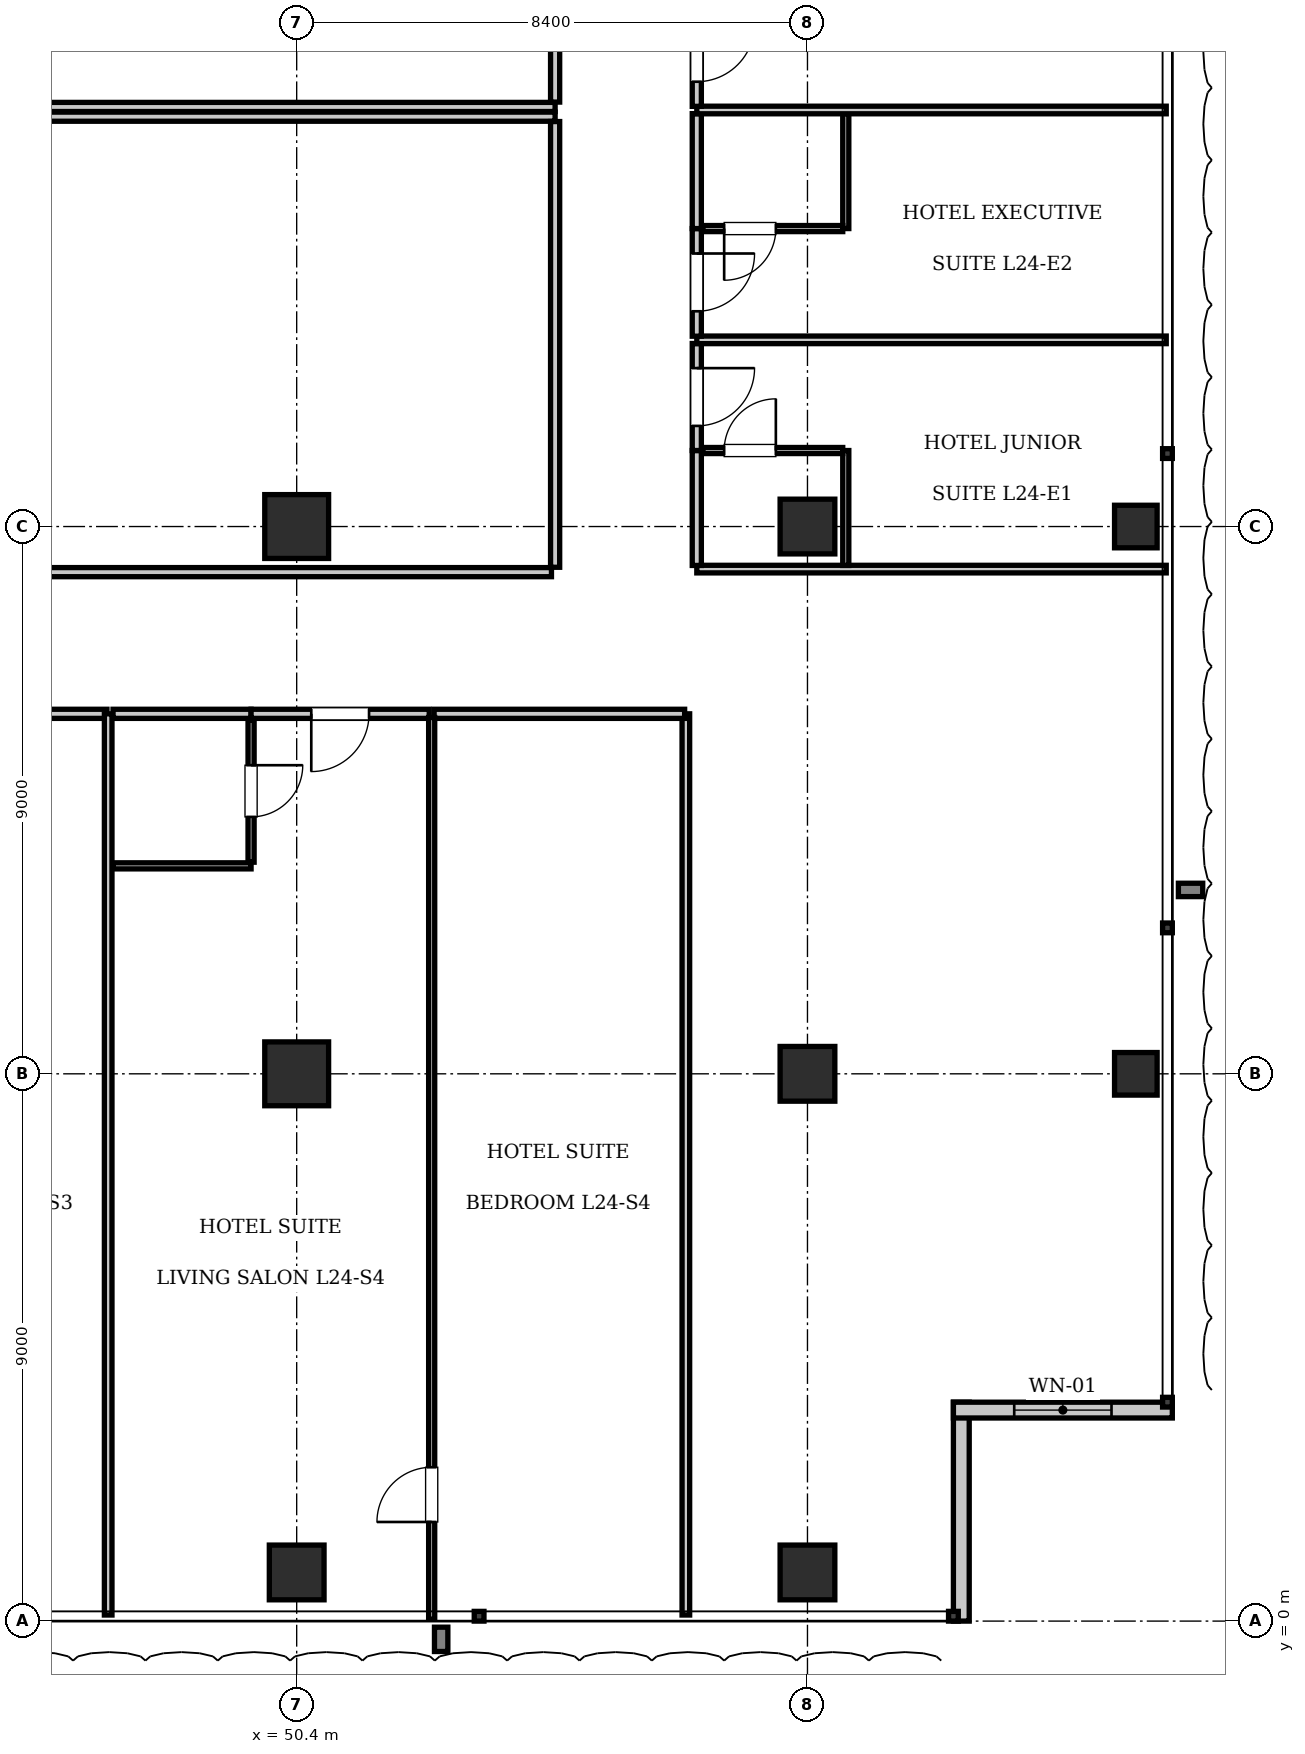
"""IFC4 building model, lengths in metres.
Left out: names, types, materials, properties, quantities, classifications, styles, units other than length and angle.
Written with IfcOpenShell. Run it as: python <this file> out.ifc"""

import sys

from ifc_helpers import new_model, si_unit, direction, frame, frame_2d, origin, origin_2d, place, context, subcontext, project, spatial, rectangle, i_section, extrude, element, fill, save


model = new_model("IFC4")
c1 = context("Model", 3, precision=1e-05, world=origin(), true_north=direction((0.0, 1.0)))
c2 = subcontext(c1, "Body", "Model", "MODEL_VIEW")
j1 = project(units=[si_unit("LENGTHUNIT", "METRE"), si_unit("PLANEANGLEUNIT", "RADIAN")], contexts=[c1])
p1 = place(None, origin())
s1 = spatial("IfcSite", under=j1, at=p1, CompositionType="ELEMENT")
p2 = place(p1, origin())
s2 = spatial("IfcBuilding", under=s1, at=p2, CompositionType="ELEMENT")
p3 = place(p2, frame((0.0, 0.0, 100.1)))
s3 = spatial("IfcBuildingStorey", under=s2, at=p3, CompositionType="ELEMENT", Elevation=100.1)
for number, where, z_axis, x_axis in (
    (1, (50.4, 18.0, 0.0), (0.0, 0.0, 1.0), (1.0, 0.0, 0.0)),
    (2, (50.4, 9.0, 0.0), (0.0, 0.0, 1.0), (1.0, 0.0, 0.0)),
):
    element("IfcColumn", number, at=place(p3, frame(where, z_axis=z_axis, x_axis=x_axis)), inside=s3, PredefinedType="COLUMN", context=c2, shape_type="SweptSolid", body=[
        extrude(rectangle(XDim=1.05, YDim=1.05, at=origin_2d()), origin(), (0.0, 0.0, 1.0), 3.85),
    ])
for number, where, z_axis, x_axis in (
    (3, (58.8, 9.0, 0.0), (0.0, 0.0, 1.0), (1.0, 0.0, 0.0)),
    (4, (58.8, 18.0, 0.0), (0.0, 0.0, 1.0), (1.0, 0.0, 0.0)),
    (5, (50.4, 0.8, 0.0), (0.0, 0.0, 1.0), (1.0, 0.0, 0.0)),
    (6, (58.8, 0.8, 0.0), (0.0, 0.0, 1.0), (1.0, 0.0, 0.0)),
):
    element("IfcColumn", number, at=place(p3, frame(where, z_axis=z_axis, x_axis=x_axis)), inside=s3, PredefinedType="COLUMN", context=c2, shape_type="SweptSolid", body=[
        extrude(rectangle(XDim=0.9, YDim=0.9, at=origin_2d()), origin(), (0.0, 0.0, 1.0), 3.85),
    ])
for number, where, z_axis, x_axis in (
    (7, (64.2, 9.0, 0.0), (0.0, 0.0, 1.0), (1.0, 0.0, 0.0)),
    (8, (64.2, 18.0, 0.0), (0.0, 0.0, 1.0), (1.0, 0.0, 0.0)),
):
    element("IfcColumn", number, at=place(p3, frame(where, z_axis=z_axis, x_axis=x_axis)), inside=s3, PredefinedType="COLUMN", context=c2, shape_type="SweptSolid", body=[
        extrude(i_section(OverallWidth=0.7, OverallDepth=0.7, WebThickness=0.028, FlangeThickness=0.044, at=origin_2d()), origin(), (0.0, 0.0, 1.0), 3.85),
    ])
p4 = place(p3, frame((61.33, 3.6, 0.0), z_axis=(0.0, 0.0, 1.0), x_axis=(0.0, -1.0, 0.0)))
e9 = element("IfcWall", 9, at=p4, inside=s3, PredefinedType="SOLIDWALL", context=c2, shape_type="SweptSolid", body=[
    extrude(rectangle(XDim=3.6, YDim=0.26, at=frame_2d((1.8, 0.0))), origin(), (0.0, 0.0, 1.0), 3.61),
])
p5 = place(p3, frame((64.8, 3.47, 0.0), z_axis=(0.0, 0.0, 1.0), x_axis=(-1.0, 0.0, 0.0)))
e10 = element("IfcWall", 10, at=p5, inside=s3, PredefinedType="SOLIDWALL", context=c2, shape_type="SweptSolid", body=[
    extrude(rectangle(XDim=3.6, YDim=0.26, at=frame_2d((1.8, 0.0))), origin(), (0.0, 0.0, 1.0), 3.61),
])
p6 = place(p5, frame((1.0, 0.0, 0.9)))
e11 = element("IfcOpeningElement", 11, at=p6, cuts=e10, PredefinedType="OPENING", context=c2, shape_type="SweptSolid", body=[
    extrude(rectangle(XDim=1.6, YDim=2.1, at=frame_2d((0.8, 1.05))), frame((0.0, 0.14, 0.0), z_axis=(0.0, -1.0, 0.0), x_axis=(1.0, 0.0, 0.0)), (0.0, 0.0, 1.0), 0.28),
])
p7 = place(p3, frame((20.95, 24.9, 0.0), z_axis=(0.0, 0.0, 1.0), x_axis=(1.0, 0.0, 0.0)))
e12 = element("IfcWall", 12, at=p7, inside=s3, PredefinedType="PARTITIONING", context=c2, shape_type="SweptSolid", body=[
    extrude(rectangle(XDim=33.7, YDim=0.15, at=frame_2d((16.85, 0.0))), origin(), (0.0, 0.0, 1.0), 3.61),
])
p8 = place(p3, frame((54.65, 24.98, 0.0), z_axis=(0.0, 0.0, 1.0), x_axis=(0.0, 1.0, 0.0)))
e13 = element("IfcWall", 13, at=p8, inside=s3, PredefinedType="PARTITIONING", context=c2, shape_type="SweptSolid", body=[
    extrude(rectangle(XDim=7.34, YDim=0.15, at=frame_2d((3.67, 0.0))), origin(), (0.0, 0.0, 1.0), 3.293),
])
p9 = place(p3, frame((20.95, 24.74, 0.0), z_axis=(0.0, 0.0, 1.0), x_axis=(1.0, 0.0, 0.0)))
e14 = element("IfcWall", 14, at=p9, inside=s3, PredefinedType="PARTITIONING", context=c2, shape_type="SweptSolid", body=[
    extrude(rectangle(XDim=33.7, YDim=0.15, at=frame_2d((16.85, 0.0))), origin(), (0.0, 0.0, 1.0), 3.61),
])
p10 = place(p3, frame((54.65, 17.33, 0.0), z_axis=(0.0, 0.0, 1.0), x_axis=(0.0, 1.0, 0.0)))
e15 = element("IfcWall", 15, at=p10, inside=s3, PredefinedType="PARTITIONING", context=c2, shape_type="SweptSolid", body=[
    extrude(rectangle(XDim=7.33, YDim=0.15, at=frame_2d((3.665, 0.0))), origin(), (0.0, 0.0, 1.0), 3.255),
])
p11 = place(p3, frame((33.449, 17.25, 0.0), z_axis=(0.0, 0.0, 1.0), x_axis=(1.0, 0.0, 0.0)))
e16 = element("IfcWall", 16, at=p11, inside=s3, PredefinedType="PARTITIONING", context=c2, shape_type="SweptSolid", body=[
    extrude(rectangle(XDim=21.141, YDim=0.15, at=frame_2d((10.571, 0.0))), origin(), (0.0, 0.0, 1.0), 3.61),
])
p12 = place(p11, frame((10.121, 0.0, 0.0)))
e17 = element("IfcOpeningElement", 17, at=p12, cuts=e16, PredefinedType="OPENING", context=c2, shape_type="SweptSolid", body=[
    extrude(rectangle(XDim=0.9, YDim=2.1, at=frame_2d((0.45, 1.05))), frame((0.0, 0.085, 0.0), z_axis=(0.0, -1.0, 0.0), x_axis=(1.0, 0.0, 0.0)), (0.0, 0.0, 1.0), 0.17),
])
p13 = place(p3, frame((56.8, 0.1, 0.0), z_axis=(0.0, 0.0, 1.0), x_axis=(0.0, 1.0, 0.0)))
e18 = element("IfcWall", 18, at=p13, inside=s3, PredefinedType="PARTITIONING", context=c2, shape_type="SweptSolid", body=[
    extrude(rectangle(XDim=14.82, YDim=0.125, at=frame_2d((7.41, 0.0))), origin(), (0.0, 0.0, 1.0), 3.61),
])
p14 = place(p3, frame((43.16, 14.92, 0.0), z_axis=(0.0, 0.0, 1.0), x_axis=(1.0, 0.0, 0.0)))
e19 = element("IfcWall", 19, at=p14, inside=s3, PredefinedType="PARTITIONING", context=c2, shape_type="SweptSolid", body=[
    extrude(rectangle(XDim=4.12, YDim=0.15, at=frame_2d((2.06, 0.0))), origin(), (0.0, 0.0, 1.0), 3.61),
])
p15 = place(p3, frame((47.3, 0.1, 0.0), z_axis=(0.0, 0.0, 1.0), x_axis=(0.0, 1.0, 0.0)))
e20 = element("IfcWall", 20, at=p15, inside=s3, PredefinedType="PARTITIONING", context=c2, shape_type="SweptSolid", body=[
    extrude(rectangle(XDim=14.82, YDim=0.125, at=frame_2d((7.41, 0.0))), origin(), (0.0, 0.0, 1.0), 3.61),
])
p16 = place(p3, frame((47.38, 14.92, 0.0), z_axis=(0.0, 0.0, 1.0), x_axis=(1.0, 0.0, 0.0)))
e21 = element("IfcWall", 21, at=p16, inside=s3, PredefinedType="PARTITIONING", context=c2, shape_type="SweptSolid", body=[
    extrude(rectangle(XDim=2.27, YDim=0.15, at=frame_2d((1.135, 0.0))), origin(), (0.0, 0.0, 1.0), 3.61),
])
p17 = place(p3, frame((47.38, 12.42, 0.0), z_axis=(0.0, 0.0, 1.0), x_axis=(1.0, 0.0, 0.0)))
e22 = element("IfcWall", 22, at=p17, inside=s3, PredefinedType="PARTITIONING", context=c2, shape_type="SweptSolid", body=[
    extrude(rectangle(XDim=2.27, YDim=0.1, at=frame_2d((1.135, 0.0))), origin(), (0.0, 0.0, 1.0), 3.61),
])
p18 = place(p3, frame((49.65, 12.48, 0.0), z_axis=(0.0, 0.0, 1.0), x_axis=(0.0, 1.0, 0.0)))
e23 = element("IfcWall", 23, at=p18, inside=s3, PredefinedType="PARTITIONING", context=c2, shape_type="SweptSolid", body=[
    extrude(rectangle(XDim=2.34, YDim=0.1, at=frame_2d((1.17, 0.0))), origin(), (0.0, 0.0, 1.0), 3.61),
])
p19 = place(p18, frame((0.745, 0.0, 0.0)))
e24 = element("IfcOpeningElement", 24, at=p19, cuts=e23, PredefinedType="OPENING", context=c2, shape_type="SweptSolid", body=[
    extrude(rectangle(XDim=0.85, YDim=2.1, at=frame_2d((0.425, 1.05))), frame((0.0, 0.06, 0.0), z_axis=(0.0, -1.0, 0.0), x_axis=(1.0, 0.0, 0.0)), (0.0, 0.0, 1.0), 0.12),
])
p20 = place(p3, frame((49.65, 14.92, 0.0), z_axis=(0.0, 0.0, 1.0), x_axis=(1.0, 0.0, 0.0)))
e25 = element("IfcWall", 25, at=p20, inside=s3, PredefinedType="PARTITIONING", context=c2, shape_type="SweptSolid", body=[
    extrude(rectangle(XDim=2.93, YDim=0.15, at=frame_2d((1.465, 0.0))), origin(), (0.0, 0.0, 1.0), 3.61),
])
p21 = place(p20, frame((0.99, 0.0, 0.0)))
e26 = element("IfcOpeningElement", 26, at=p21, cuts=e25, PredefinedType="OPENING", context=c2, shape_type="SweptSolid", body=[
    extrude(rectangle(XDim=0.95, YDim=2.15, at=frame_2d((0.475, 1.075))), frame((0.0, 0.085, 0.0), z_axis=(0.0, -1.0, 0.0), x_axis=(1.0, 0.0, 0.0)), (0.0, 0.0, 1.0), 0.17),
])
p22 = place(p3, frame((52.66, 14.92, 0.0), z_axis=(0.0, 0.0, 1.0), x_axis=(1.0, 0.0, 0.0)))
e27 = element("IfcWall", 27, at=p22, inside=s3, PredefinedType="PARTITIONING", context=c2, shape_type="SweptSolid", body=[
    extrude(rectangle(XDim=4.12, YDim=0.15, at=frame_2d((2.06, 0.0))), origin(), (0.0, 0.0, 1.0), 3.61),
])
p23 = place(p3, frame((52.62, 0.03, 0.0), z_axis=(0.0, 0.0, 1.0), x_axis=(0.0, 1.0, 0.0)))
e28 = element("IfcWall", 28, at=p23, inside=s3, PredefinedType="PARTITIONING", context=c2, shape_type="SweptSolid", body=[
    extrude(rectangle(XDim=14.83, YDim=0.1, at=frame_2d((7.415, 0.0))), origin(), (0.0, 0.0, 1.0), 3.61),
])
p24 = place(p23, frame((1.6, 0.0, 0.0)))
e29 = element("IfcOpeningElement", 29, at=p24, cuts=e28, PredefinedType="OPENING", context=c2, shape_type="SweptSolid", body=[
    extrude(rectangle(XDim=0.9, YDim=2.1, at=frame_2d((0.45, 1.05))), frame((0.0, 0.06, 0.0), z_axis=(0.0, -1.0, 0.0), x_axis=(1.0, 0.0, 0.0)), (0.0, 0.0, 1.0), 0.12),
])
p25 = place(p3, frame((56.98, 17.3, 0.0), z_axis=(0.0, 0.0, 1.0), x_axis=(1.0, 0.0, 0.0)))
e30 = element("IfcWall", 30, at=p25, inside=s3, PredefinedType="PARTITIONING", context=c2, shape_type="SweptSolid", body=[
    extrude(rectangle(XDim=7.72, YDim=0.125, at=frame_2d((3.86, 0.0))), origin(), (0.0, 0.0, 1.0), 3.61),
])
p26 = place(p3, frame((56.98, 17.36, 0.0), z_axis=(0.0, 0.0, 1.0), x_axis=(0.0, 1.0, 0.0)))
e31 = element("IfcWall", 31, at=p26, inside=s3, PredefinedType="PARTITIONING", context=c2, shape_type="SweptSolid", body=[
    extrude(rectangle(XDim=1.89, YDim=0.15, at=frame_2d((0.945, 0.0))), origin(), (0.0, 0.0, 1.0), 3.61),
])
p27 = place(p3, frame((56.98, 19.25, 0.0), z_axis=(0.0, 0.0, 1.0), x_axis=(0.0, 1.0, 0.0)))
e32 = element("IfcWall", 32, at=p27, inside=s3, PredefinedType="PARTITIONING", context=c2, shape_type="SweptSolid", body=[
    extrude(rectangle(XDim=1.76, YDim=0.15, at=frame_2d((0.88, 0.0))), origin(), (0.0, 0.0, 1.0), 3.61),
])
p28 = place(p27, frame((0.405, 0.0, 0.0)))
e33 = element("IfcOpeningElement", 33, at=p28, cuts=e32, PredefinedType="OPENING", context=c2, shape_type="SweptSolid", body=[
    extrude(rectangle(XDim=0.95, YDim=2.15, at=frame_2d((0.475, 1.075))), frame((0.0, 0.085, 0.0), z_axis=(0.0, -1.0, 0.0), x_axis=(1.0, 0.0, 0.0)), (0.0, 0.0, 1.0), 0.17),
])
p29 = place(p3, frame((59.43, 17.36, 0.0), z_axis=(0.0, 0.0, 1.0), x_axis=(0.0, 1.0, 0.0)))
e34 = element("IfcWall", 34, at=p29, inside=s3, PredefinedType="PARTITIONING", context=c2, shape_type="SweptSolid", body=[
    extrude(rectangle(XDim=1.89, YDim=0.1, at=frame_2d((0.945, 0.0))), origin(), (0.0, 0.0, 1.0), 3.61),
])
p30 = place(p3, frame((57.08, 19.25, 0.0), z_axis=(0.0, 0.0, 1.0), x_axis=(1.0, 0.0, 0.0)))
e35 = element("IfcWall", 35, at=p30, inside=s3, PredefinedType="PARTITIONING", context=c2, shape_type="SweptSolid", body=[
    extrude(rectangle(XDim=2.3, YDim=0.1, at=frame_2d((1.15, 0.0))), origin(), (0.0, 0.0, 1.0), 3.61),
])
p31 = place(p30, frame((0.35, 0.0, 0.0)))
e36 = element("IfcOpeningElement", 36, at=p31, cuts=e35, PredefinedType="OPENING", context=c2, shape_type="SweptSolid", body=[
    extrude(rectangle(XDim=0.85, YDim=2.1, at=frame_2d((0.425, 1.05))), frame((0.0, 0.06, 0.0), z_axis=(0.0, -1.0, 0.0), x_axis=(1.0, 0.0, 0.0)), (0.0, 0.0, 1.0), 0.12),
])
p32 = place(p3, frame((56.98, 21.07, 0.0), z_axis=(0.0, 0.0, 1.0), x_axis=(1.0, 0.0, 0.0)))
e37 = element("IfcWall", 37, at=p32, inside=s3, PredefinedType="PARTITIONING", context=c2, shape_type="SweptSolid", body=[
    extrude(rectangle(XDim=7.72, YDim=0.125, at=frame_2d((3.86, 0.0))), origin(), (0.0, 0.0, 1.0), 3.61),
])
p33 = place(p3, frame((56.98, 21.13, 0.0), z_axis=(0.0, 0.0, 1.0), x_axis=(0.0, 1.0, 0.0)))
e38 = element("IfcWall", 38, at=p33, inside=s3, PredefinedType="PARTITIONING", context=c2, shape_type="SweptSolid", body=[
    extrude(rectangle(XDim=1.77, YDim=0.15, at=frame_2d((0.885, 0.0))), origin(), (0.0, 0.0, 1.0), 3.61),
])
p34 = place(p33, frame((0.41, 0.0, 0.0)))
e39 = element("IfcOpeningElement", 39, at=p34, cuts=e38, PredefinedType="OPENING", context=c2, shape_type="SweptSolid", body=[
    extrude(rectangle(XDim=0.95, YDim=2.15, at=frame_2d((0.475, 1.075))), frame((0.0, 0.085, 0.0), z_axis=(0.0, -1.0, 0.0), x_axis=(1.0, 0.0, 0.0)), (0.0, 0.0, 1.0), 0.17),
])
p35 = place(p3, frame((56.98, 22.9, 0.0), z_axis=(0.0, 0.0, 1.0), x_axis=(0.0, 1.0, 0.0)))
e40 = element("IfcWall", 40, at=p35, inside=s3, PredefinedType="PARTITIONING", context=c2, shape_type="SweptSolid", body=[
    extrude(rectangle(XDim=1.89, YDim=0.15, at=frame_2d((0.945, 0.0))), origin(), (0.0, 0.0, 1.0), 3.61),
])
p36 = place(p3, frame((59.43, 22.9, 0.0), z_axis=(0.0, 0.0, 1.0), x_axis=(0.0, 1.0, 0.0)))
e41 = element("IfcWall", 41, at=p36, inside=s3, PredefinedType="PARTITIONING", context=c2, shape_type="SweptSolid", body=[
    extrude(rectangle(XDim=1.89, YDim=0.1, at=frame_2d((0.945, 0.0))), origin(), (0.0, 0.0, 1.0), 3.61),
])
p37 = place(p3, frame((57.08, 22.9, 0.0), z_axis=(0.0, 0.0, 1.0), x_axis=(1.0, 0.0, 0.0)))
e42 = element("IfcWall", 42, at=p37, inside=s3, PredefinedType="PARTITIONING", context=c2, shape_type="SweptSolid", body=[
    extrude(rectangle(XDim=2.3, YDim=0.1, at=frame_2d((1.15, 0.0))), origin(), (0.0, 0.0, 1.0), 3.61),
])
p38 = place(p37, frame((0.35, 0.0, 0.0)))
e43 = element("IfcOpeningElement", 43, at=p38, cuts=e42, PredefinedType="OPENING", context=c2, shape_type="SweptSolid", body=[
    extrude(rectangle(XDim=0.85, YDim=2.1, at=frame_2d((0.425, 1.05))), frame((0.0, 0.06, 0.0), z_axis=(0.0, -1.0, 0.0), x_axis=(1.0, 0.0, 0.0)), (0.0, 0.0, 1.0), 0.12),
])
p39 = place(p3, frame((56.98, 24.85, 0.0), z_axis=(0.0, 0.0, 1.0), x_axis=(1.0, 0.0, 0.0)))
e44 = element("IfcWall", 44, at=p39, inside=s3, PredefinedType="PARTITIONING", context=c2, shape_type="SweptSolid", body=[
    extrude(rectangle(XDim=7.72, YDim=0.125, at=frame_2d((3.86, 0.0))), origin(), (0.0, 0.0, 1.0), 3.61),
])
p40 = place(p3, frame((56.98, 24.91, 0.0), z_axis=(0.0, 0.0, 1.0), x_axis=(0.0, 1.0, 0.0)))
e45 = element("IfcWall", 45, at=p40, inside=s3, PredefinedType="PARTITIONING", context=c2, shape_type="SweptSolid", body=[
    extrude(rectangle(XDim=1.76, YDim=0.15, at=frame_2d((0.88, 0.0))), origin(), (0.0, 0.0, 1.0), 3.61),
])
p41 = place(p40, frame((0.405, 0.0, 0.0)))
e46 = element("IfcOpeningElement", 46, at=p41, cuts=e45, PredefinedType="OPENING", context=c2, shape_type="SweptSolid", body=[
    extrude(rectangle(XDim=0.95, YDim=2.15, at=frame_2d((0.475, 1.075))), frame((0.0, 0.085, 0.0), z_axis=(0.0, -1.0, 0.0), x_axis=(1.0, 0.0, 0.0)), (0.0, 0.0, 1.0), 0.17),
])
p42 = place(p6, origin())
e47 = element("IfcWindow", 47, at=p42, inside=s3, PartitioningType="SINGLE_PANEL", PredefinedType="WINDOW", context=c2, shape_type="SweptSolid", body=[
    extrude(rectangle(XDim=1.6, YDim=2.1, at=frame_2d((0.8, 1.05))), frame((0.0, 0.03, 0.0), z_axis=(0.0, -1.0, 0.0), x_axis=(1.0, 0.0, 0.0)), (0.0, 0.0, 1.0), 0.06),
])
fill(e11, e47)
p43 = place(p19, frame((0.85, 0.0, 0.0), z_axis=(0.0, 0.0, 1.0), x_axis=(-1.0, 0.0, 0.0)))
e48 = element("IfcDoor", 48, at=p43, inside=s3, OperationType="SINGLE_SWING_LEFT", PredefinedType="DOOR", context=c2, shape_type="SweptSolid", body=[
    extrude(rectangle(XDim=0.85, YDim=2.1, at=frame_2d((0.425, 1.05))), frame((0.0, 0.025, 0.0), z_axis=(0.0, -1.0, 0.0), x_axis=(1.0, 0.0, 0.0)), (0.0, 0.0, 1.0), 0.05),
])
fill(e24, e48)
p44 = place(p21, frame((0.95, 0.0, 0.0), z_axis=(0.0, 0.0, 1.0), x_axis=(-1.0, 0.0, 0.0)))
e49 = element("IfcDoor", 49, at=p44, inside=s3, OperationType="SINGLE_SWING_RIGHT", PredefinedType="DOOR", context=c2, shape_type="SweptSolid", body=[
    extrude(rectangle(XDim=0.95, YDim=2.15, at=frame_2d((0.475, 1.075))), frame((0.0, 0.025, 0.0), z_axis=(0.0, -1.0, 0.0), x_axis=(1.0, 0.0, 0.0)), (0.0, 0.0, 1.0), 0.05),
])
fill(e26, e49)
p45 = place(p24, origin())
e50 = element("IfcDoor", 50, at=p45, inside=s3, OperationType="SINGLE_SWING_LEFT", PredefinedType="DOOR", context=c2, shape_type="SweptSolid", body=[
    extrude(rectangle(XDim=0.9, YDim=2.1, at=frame_2d((0.45, 1.05))), frame((0.0, 0.025, 0.0), z_axis=(0.0, -1.0, 0.0), x_axis=(1.0, 0.0, 0.0)), (0.0, 0.0, 1.0), 0.05),
])
fill(e29, e50)
p46 = place(p31, origin())
e51 = element("IfcDoor", 51, at=p46, inside=s3, OperationType="SINGLE_SWING_RIGHT", PredefinedType="DOOR", context=c2, shape_type="SweptSolid", body=[
    extrude(rectangle(XDim=0.85, YDim=2.1, at=frame_2d((0.425, 1.05))), frame((0.0, 0.025, 0.0), z_axis=(0.0, -1.0, 0.0), x_axis=(1.0, 0.0, 0.0)), (0.0, 0.0, 1.0), 0.05),
])
fill(e36, e51)
p47 = place(p28, frame((0.95, 0.0, 0.0), z_axis=(0.0, 0.0, 1.0), x_axis=(-1.0, 0.0, 0.0)))
e52 = element("IfcDoor", 52, at=p47, inside=s3, OperationType="SINGLE_SWING_LEFT", PredefinedType="DOOR", context=c2, shape_type="SweptSolid", body=[
    extrude(rectangle(XDim=0.95, YDim=2.15, at=frame_2d((0.475, 1.075))), frame((0.0, 0.025, 0.0), z_axis=(0.0, -1.0, 0.0), x_axis=(1.0, 0.0, 0.0)), (0.0, 0.0, 1.0), 0.05),
])
fill(e33, e52)
p48 = place(p38, frame((0.85, 0.0, 0.0), z_axis=(0.0, 0.0, 1.0), x_axis=(-1.0, 0.0, 0.0)))
e53 = element("IfcDoor", 53, at=p48, inside=s3, OperationType="SINGLE_SWING_RIGHT", PredefinedType="DOOR", context=c2, shape_type="SweptSolid", body=[
    extrude(rectangle(XDim=0.85, YDim=2.1, at=frame_2d((0.425, 1.05))), frame((0.0, 0.025, 0.0), z_axis=(0.0, -1.0, 0.0), x_axis=(1.0, 0.0, 0.0)), (0.0, 0.0, 1.0), 0.05),
])
fill(e43, e53)
p49 = place(p34, frame((0.95, 0.0, 0.0), z_axis=(0.0, 0.0, 1.0), x_axis=(-1.0, 0.0, 0.0)))
e54 = element("IfcDoor", 54, at=p49, inside=s3, OperationType="SINGLE_SWING_LEFT", PredefinedType="DOOR", context=c2, shape_type="SweptSolid", body=[
    extrude(rectangle(XDim=0.95, YDim=2.15, at=frame_2d((0.475, 1.075))), frame((0.0, 0.025, 0.0), z_axis=(0.0, -1.0, 0.0), x_axis=(1.0, 0.0, 0.0)), (0.0, 0.0, 1.0), 0.05),
])
fill(e39, e54)
p50 = place(p41, frame((0.95, 0.0, 0.0), z_axis=(0.0, 0.0, 1.0), x_axis=(-1.0, 0.0, 0.0)))
e55 = element("IfcDoor", 55, at=p50, inside=s3, OperationType="SINGLE_SWING_LEFT", PredefinedType="DOOR", context=c2, shape_type="SweptSolid", body=[
    extrude(rectangle(XDim=0.95, YDim=2.15, at=frame_2d((0.475, 1.075))), frame((0.0, 0.025, 0.0), z_axis=(0.0, -1.0, 0.0), x_axis=(1.0, 0.0, 0.0)), (0.0, 0.0, 1.0), 0.05),
])
fill(e46, e55)
save(model, sys.argv[1])
